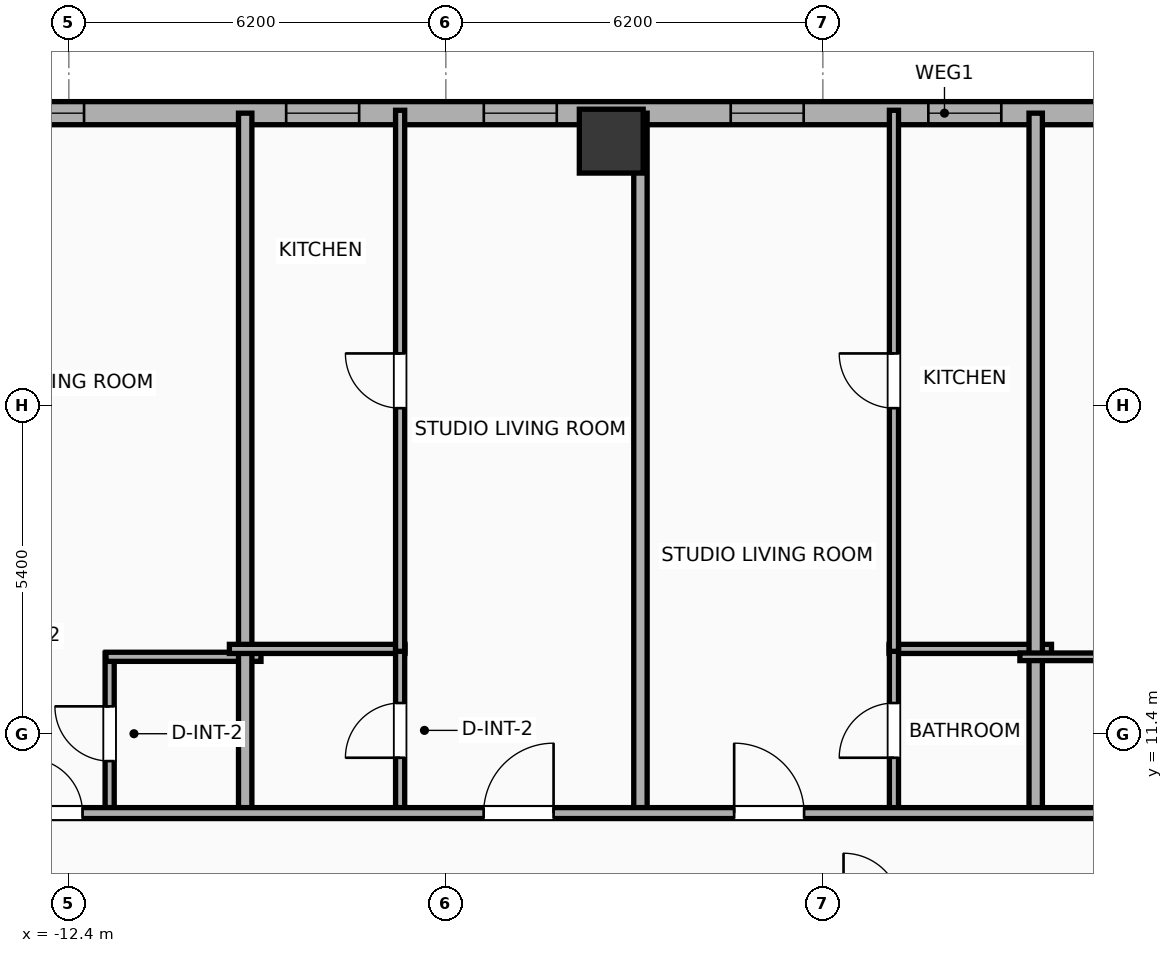
"""IFC4 building model, lengths in metres.
Left out: names, types, materials, properties, quantities, classifications, styles, units other than length and angle.
Written with IfcOpenShell. Run it as: python <this file> out.ifc"""

import sys

from ifc_helpers import new_model, si_unit, direction, frame, frame_2d, origin, origin_2d, place, context, subcontext, project, spatial, rectangle, hollow_rectangle, extrude, element, fill, save


model = new_model("IFC4")
c1 = context("Model", 3, precision=1e-05, world=origin(), true_north=direction((0.0, 1.0)))
c2 = subcontext(c1, "Body", "Model", "MODEL_VIEW")
j1 = project(units=[si_unit("LENGTHUNIT", "METRE"), si_unit("PLANEANGLEUNIT", "RADIAN")], contexts=[c1])
p1 = place(None, origin())
s1 = spatial("IfcSite", under=j1, at=p1, CompositionType="ELEMENT")
p2 = place(p1, origin())
s2 = spatial("IfcBuilding", under=s1, at=p2, CompositionType="ELEMENT")
p3 = place(p2, frame((0.0, 0.0, 128.7)))
s3 = spatial("IfcBuildingStorey", under=s2, at=p3, CompositionType="ELEMENT", Elevation=128.7)
p4 = place(p3, frame((-3.48, 21.15, 0.0), z_axis=(0.0, 0.0, 1.0), x_axis=(1.0, 0.0, 0.0)))
e1 = element("IfcColumn", 1, at=p4, inside=s3, PredefinedType="COLUMN", context=c2, shape_type="SweptSolid", body=[
    extrude(hollow_rectangle(XDim=1.05, YDim=1.05, WallThickness=0.036, at=origin_2d()), origin(), (0.0, 0.0, 1.0), 3.9),
])
p5 = place(p3, frame((-25.381, 21.61, 0.0), z_axis=(0.0, 0.0, 1.0), x_axis=(1.0, 0.0, 0.0)))
e2 = element("IfcWall", 2, at=p5, inside=s3, PredefinedType="ELEMENTEDWALL", context=c2, shape_type="SweptSolid", body=[
    extrude(rectangle(XDim=54.763, YDim=0.38, at=frame_2d((27.381, 0.0))), origin(), (0.0, 0.0, 1.0), 3.65),
])
p6 = place(p5, frame((5.645, 0.0, 0.75)))
e3 = element("IfcOpeningElement", 3, at=p6, cuts=e2, PredefinedType="OPENING", context=c2, shape_type="SweptSolid", body=[
    extrude(rectangle(XDim=2.4, YDim=2.1, at=frame_2d((1.2, 1.05))), frame((0.0, 0.2, 0.0), z_axis=(0.0, -1.0, 0.0), x_axis=(1.0, 0.0, 0.0)), (0.0, 0.0, 1.0), 0.4),
])
p7 = place(p5, frame((45.067, 0.0, 0.75)))
e4 = element("IfcOpeningElement", 4, at=p7, cuts=e2, PredefinedType="OPENING", context=c2, shape_type="SweptSolid", body=[
    extrude(rectangle(XDim=2.4, YDim=2.1, at=frame_2d((1.2, 1.05))), frame((0.0, 0.2, 0.0), z_axis=(0.0, -1.0, 0.0), x_axis=(1.0, 0.0, 0.0)), (0.0, 0.0, 1.0), 0.4),
])
p8 = place(p5, frame((1.286, 0.0, 0.75)))
e5 = element("IfcOpeningElement", 5, at=p8, cuts=e2, PredefinedType="OPENING", context=c2, shape_type="SweptSolid", body=[
    extrude(rectangle(XDim=1.2, YDim=2.05, at=frame_2d((0.6, 1.025))), frame((0.0, 0.2, 0.0), z_axis=(0.0, -1.0, 0.0), x_axis=(1.0, 0.0, 0.0)), (0.0, 0.0, 1.0), 0.4),
])
p9 = place(p5, frame((3.501, 0.0, 0.75)))
e6 = element("IfcOpeningElement", 6, at=p9, cuts=e2, PredefinedType="OPENING", context=c2, shape_type="SweptSolid", body=[
    extrude(rectangle(XDim=1.2, YDim=2.05, at=frame_2d((0.6, 1.025))), frame((0.0, 0.2, 0.0), z_axis=(0.0, -1.0, 0.0), x_axis=(1.0, 0.0, 0.0)), (0.0, 0.0, 1.0), 0.4),
])
p10 = place(p5, frame((12.031, 0.0, 0.75)))
e7 = element("IfcOpeningElement", 7, at=p10, cuts=e2, PredefinedType="OPENING", context=c2, shape_type="SweptSolid", body=[
    extrude(rectangle(XDim=1.2, YDim=2.05, at=frame_2d((0.6, 1.025))), frame((0.0, 0.2, 0.0), z_axis=(0.0, -1.0, 0.0), x_axis=(1.0, 0.0, 0.0)), (0.0, 0.0, 1.0), 0.4),
])
p11 = place(p5, frame((19.805, 0.0, 0.75)))
e8 = element("IfcOpeningElement", 8, at=p11, cuts=e2, PredefinedType="OPENING", context=c2, shape_type="SweptSolid", body=[
    extrude(rectangle(XDim=1.2, YDim=2.05, at=frame_2d((0.6, 1.025))), frame((0.0, 0.2, 0.0), z_axis=(0.0, -1.0, 0.0), x_axis=(1.0, 0.0, 0.0)), (0.0, 0.0, 1.0), 0.4),
])
p12 = place(p5, frame((16.555, 0.0, 0.75)))
e9 = element("IfcOpeningElement", 9, at=p12, cuts=e2, PredefinedType="OPENING", context=c2, shape_type="SweptSolid", body=[
    extrude(rectangle(XDim=1.2, YDim=2.05, at=frame_2d((0.6, 1.025))), frame((0.0, 0.2, 0.0), z_axis=(0.0, -1.0, 0.0), x_axis=(1.0, 0.0, 0.0)), (0.0, 0.0, 1.0), 0.4),
])
p13 = place(p5, frame((23.866, 0.0, 0.75)))
e10 = element("IfcOpeningElement", 10, at=p13, cuts=e2, PredefinedType="OPENING", context=c2, shape_type="SweptSolid", body=[
    extrude(rectangle(XDim=1.2, YDim=2.05, at=frame_2d((0.6, 1.025))), frame((0.0, 0.2, 0.0), z_axis=(0.0, -1.0, 0.0), x_axis=(1.0, 0.0, 0.0)), (0.0, 0.0, 1.0), 0.4),
])
p14 = place(p5, frame((27.116, 0.0, 0.75)))
e11 = element("IfcOpeningElement", 11, at=p14, cuts=e2, PredefinedType="OPENING", context=c2, shape_type="SweptSolid", body=[
    extrude(rectangle(XDim=1.2, YDim=2.05, at=frame_2d((0.6, 1.025))), frame((0.0, 0.2, 0.0), z_axis=(0.0, -1.0, 0.0), x_axis=(1.0, 0.0, 0.0)), (0.0, 0.0, 1.0), 0.4),
])
p15 = place(p5, frame((30.931, 0.0, 0.75)))
e12 = element("IfcOpeningElement", 12, at=p15, cuts=e2, PredefinedType="OPENING", context=c2, shape_type="SweptSolid", body=[
    extrude(rectangle(XDim=1.2, YDim=2.05, at=frame_2d((0.6, 1.025))), frame((0.0, 0.2, 0.0), z_axis=(0.0, -1.0, 0.0), x_axis=(1.0, 0.0, 0.0)), (0.0, 0.0, 1.0), 0.4),
])
p16 = place(p5, frame((36.811, 0.0, 0.75)))
e13 = element("IfcOpeningElement", 13, at=p16, cuts=e2, PredefinedType="OPENING", context=c2, shape_type="SweptSolid", body=[
    extrude(rectangle(XDim=1.2, YDim=2.05, at=frame_2d((0.6, 1.025))), frame((0.0, 0.2, 0.0), z_axis=(0.0, -1.0, 0.0), x_axis=(1.0, 0.0, 0.0)), (0.0, 0.0, 1.0), 0.4),
])
p17 = place(p5, frame((40.061, 0.0, 0.75)))
e14 = element("IfcOpeningElement", 14, at=p17, cuts=e2, PredefinedType="OPENING", context=c2, shape_type="SweptSolid", body=[
    extrude(rectangle(XDim=1.2, YDim=2.05, at=frame_2d((0.6, 1.025))), frame((0.0, 0.2, 0.0), z_axis=(0.0, -1.0, 0.0), x_axis=(1.0, 0.0, 0.0)), (0.0, 0.0, 1.0), 0.4),
])
p18 = place(p5, frame((50.527, 0.0, 0.75)))
e15 = element("IfcOpeningElement", 15, at=p18, cuts=e2, PredefinedType="OPENING", context=c2, shape_type="SweptSolid", body=[
    extrude(rectangle(XDim=1.2, YDim=2.05, at=frame_2d((0.6, 1.025))), frame((0.0, 0.2, 0.0), z_axis=(0.0, -1.0, 0.0), x_axis=(1.0, 0.0, 0.0)), (0.0, 0.0, 1.0), 0.4),
])
p19 = place(p3, frame((-11.729, 10.08, 0.0), z_axis=(0.0, 0.0, 1.0), x_axis=(0.0, 1.0, 0.0)))
e16 = element("IfcWall", 16, at=p19, inside=s3, PredefinedType="PLUMBINGWALL", context=c2, shape_type="SweptSolid", body=[
    extrude(rectangle(XDim=2.65, YDim=0.15, at=frame_2d((1.325, 0.0))), origin(), (0.0, 0.0, 1.0), 3.65),
])
p20 = place(p19, frame((0.875, 0.0, 0.0)))
e17 = element("IfcOpeningElement", 17, at=p20, cuts=e16, PredefinedType="OPENING", context=c2, shape_type="SweptSolid", body=[
    extrude(rectangle(XDim=0.9, YDim=2.05, at=frame_2d((0.45, 1.025))), frame((0.0, 0.085, 0.0), z_axis=(0.0, -1.0, 0.0), x_axis=(1.0, 0.0, 0.0)), (0.0, 0.0, 1.0), 0.17),
])
p21 = place(p3, frame((-11.789, 12.67, 0.0), z_axis=(0.0, 0.0, 1.0), x_axis=(1.0, 0.0, 0.0)))
e18 = element("IfcWall", 18, at=p21, inside=s3, PredefinedType="PLUMBINGWALL", context=c2, shape_type="SweptSolid", body=[
    extrude(rectangle(XDim=2.549, YDim=0.15, at=frame_2d((1.274, 0.0))), origin(), (0.0, 0.0, 1.0), 3.65),
])
p22 = place(p3, frame((-9.5, 10.02, 0.0), z_axis=(0.0, 0.0, 1.0), x_axis=(0.0, 1.0, 0.0)))
e19 = element("IfcWall", 19, at=p22, inside=s3, PredefinedType="PARTITIONING", context=c2, shape_type="SweptSolid", body=[
    extrude(rectangle(XDim=11.59, YDim=0.22, at=frame_2d((5.795, 0.0))), origin(), (0.0, 0.0, 1.0), 3.65),
])
p23 = place(p3, frame((-9.76, 12.8, 0.0), z_axis=(0.0, 0.0, 1.0), x_axis=(1.0, 0.0, 0.0)))
e20 = element("IfcWall", 20, at=p23, inside=s3, PredefinedType="PLUMBINGWALL", context=c2, shape_type="SweptSolid", body=[
    extrude(rectangle(XDim=2.888, YDim=0.15, at=frame_2d((1.444, 0.0))), origin(), (0.0, 0.0, 1.0), 3.65),
])
p24 = place(p3, frame((-6.952, 10.08, 0.0), z_axis=(0.0, 0.0, 1.0), x_axis=(0.0, 1.0, 0.0)))
e21 = element("IfcWall", 21, at=p24, inside=s3, PredefinedType="PLUMBINGWALL", context=c2, shape_type="SweptSolid", body=[
    extrude(rectangle(XDim=2.76, YDim=0.15, at=frame_2d((1.38, 0.0))), origin(), (0.0, 0.0, 1.0), 3.65),
])
p25 = place(p24, frame((0.93, 0.0, 0.0)))
e22 = element("IfcOpeningElement", 22, at=p25, cuts=e21, PredefinedType="OPENING", context=c2, shape_type="SweptSolid", body=[
    extrude(rectangle(XDim=0.9, YDim=2.05, at=frame_2d((0.45, 1.025))), frame((0.0, 0.085, 0.0), z_axis=(0.0, -1.0, 0.0), x_axis=(1.0, 0.0, 0.0)), (0.0, 0.0, 1.0), 0.17),
])
p26 = place(p3, frame((-6.952, 12.76, 0.0), z_axis=(0.0, 0.0, 1.0), x_axis=(0.0, 1.0, 0.0)))
e23 = element("IfcWall", 23, at=p26, inside=s3, PredefinedType="PLUMBINGWALL", context=c2, shape_type="SweptSolid", body=[
    extrude(rectangle(XDim=8.898, YDim=0.15, at=frame_2d((4.449, 0.0))), origin(), (0.0, 0.0, 1.0), 3.65),
])
p27 = place(p26, frame((3.999, 0.0, 0.0)))
e24 = element("IfcOpeningElement", 24, at=p27, cuts=e23, PredefinedType="OPENING", context=c2, shape_type="SweptSolid", body=[
    extrude(rectangle(XDim=0.9, YDim=2.05, at=frame_2d((0.45, 1.025))), frame((0.0, 0.085, 0.0), z_axis=(0.0, -1.0, 0.0), x_axis=(1.0, 0.0, 0.0)), (0.0, 0.0, 1.0), 0.17),
])
p28 = place(p3, frame((-3.0, 10.02, 0.0), z_axis=(0.0, 0.0, 1.0), x_axis=(0.0, 1.0, 0.0)))
e25 = element("IfcWall", 25, at=p28, inside=s3, PredefinedType="PARTITIONING", context=c2, shape_type="SweptSolid", body=[
    extrude(rectangle(XDim=11.59, YDim=0.22, at=frame_2d((5.795, 0.0))), origin(), (0.0, 0.0, 1.0), 3.65),
])
p29 = place(p3, frame((1.089, 12.8, 0.0), z_axis=(0.0, 0.0, 1.0), x_axis=(1.0, 0.0, 0.0)))
e26 = element("IfcWall", 26, at=p29, inside=s3, PredefinedType="PLUMBINGWALL", context=c2, shape_type="SweptSolid", body=[
    extrude(rectangle(XDim=2.671, YDim=0.15, at=frame_2d((1.335, 0.0))), origin(), (0.0, 0.0, 1.0), 3.65),
])
p30 = place(p3, frame((1.169, 10.08, 0.0), z_axis=(0.0, 0.0, 1.0), x_axis=(0.0, 1.0, 0.0)))
e27 = element("IfcWall", 27, at=p30, inside=s3, PredefinedType="PLUMBINGWALL", context=c2, shape_type="SweptSolid", body=[
    extrude(rectangle(XDim=2.76, YDim=0.15, at=frame_2d((1.38, 0.0))), origin(), (0.0, 0.0, 1.0), 3.65),
])
p31 = place(p30, frame((0.93, 0.0, 0.0)))
e28 = element("IfcOpeningElement", 28, at=p31, cuts=e27, PredefinedType="OPENING", context=c2, shape_type="SweptSolid", body=[
    extrude(rectangle(XDim=0.9, YDim=2.05, at=frame_2d((0.45, 1.025))), frame((0.0, 0.085, 0.0), z_axis=(0.0, -1.0, 0.0), x_axis=(1.0, 0.0, 0.0)), (0.0, 0.0, 1.0), 0.17),
])
p32 = place(p3, frame((1.169, 12.76, 0.0), z_axis=(0.0, 0.0, 1.0), x_axis=(0.0, 1.0, 0.0)))
e29 = element("IfcWall", 29, at=p32, inside=s3, PredefinedType="PLUMBINGWALL", context=c2, shape_type="SweptSolid", body=[
    extrude(rectangle(XDim=8.898, YDim=0.15, at=frame_2d((4.449, 0.0))), origin(), (0.0, 0.0, 1.0), 3.65),
])
p33 = place(p32, frame((3.999, 0.0, 0.0)))
e30 = element("IfcOpeningElement", 30, at=p33, cuts=e29, PredefinedType="OPENING", context=c2, shape_type="SweptSolid", body=[
    extrude(rectangle(XDim=0.9, YDim=2.05, at=frame_2d((0.45, 1.025))), frame((0.0, 0.085, 0.0), z_axis=(0.0, -1.0, 0.0), x_axis=(1.0, 0.0, 0.0)), (0.0, 0.0, 1.0), 0.17),
])
p34 = place(p3, frame((3.5, 10.02, 0.0), z_axis=(0.0, 0.0, 1.0), x_axis=(0.0, 1.0, 0.0)))
e31 = element("IfcWall", 31, at=p34, inside=s3, PredefinedType="PARTITIONING", context=c2, shape_type="SweptSolid", body=[
    extrude(rectangle(XDim=11.59, YDim=0.22, at=frame_2d((5.795, 0.0))), origin(), (0.0, 0.0, 1.0), 3.65),
])
p35 = place(p3, frame((3.24, 12.67, 0.0), z_axis=(0.0, 0.0, 1.0), x_axis=(1.0, 0.0, 0.0)))
e32 = element("IfcWall", 32, at=p35, inside=s3, PredefinedType="PARTITIONING", context=c2, shape_type="SweptSolid", body=[
    extrude(rectangle(XDim=2.804, YDim=0.125, at=frame_2d((1.402, 0.0))), origin(), (0.0, 0.0, 1.0), 3.65),
])
p36 = place(p3, frame((-29.21, 10.1, 0.0), z_axis=(0.0, 0.0, 1.0), x_axis=(1.0, 0.0, 0.0)))
e33 = element("IfcWall", 33, at=p36, inside=s3, PredefinedType="PARTITIONING", context=c2, shape_type="SweptSolid", body=[
    extrude(rectangle(XDim=62.42, YDim=0.18, at=frame_2d((31.21, 0.0))), origin(), (0.0, 0.0, 1.0), 3.65),
])
p37 = place(p36, frame((3.033, 0.0, 0.0)))
e34 = element("IfcOpeningElement", 34, at=p37, cuts=e33, PredefinedType="OPENING", context=c2, shape_type="SweptSolid", body=[
    extrude(rectangle(XDim=0.9, YDim=2.05, at=frame_2d((0.45, 1.025))), frame((0.0, 0.1, 0.0), z_axis=(0.0, -1.0, 0.0), x_axis=(1.0, 0.0, 0.0)), (0.0, 0.0, 1.0), 0.2),
])
p38 = place(p36, frame((10.573, 0.0, 0.0)))
e35 = element("IfcOpeningElement", 35, at=p38, cuts=e33, PredefinedType="OPENING", context=c2, shape_type="SweptSolid", body=[
    extrude(rectangle(XDim=1.15, YDim=2.05, at=frame_2d((0.575, 1.025))), frame((0.0, 0.1, 0.0), z_axis=(0.0, -1.0, 0.0), x_axis=(1.0, 0.0, 0.0)), (0.0, 0.0, 1.0), 0.2),
])
p39 = place(p36, frame((16.135, 0.0, 0.0)))
e36 = element("IfcOpeningElement", 36, at=p39, cuts=e33, PredefinedType="OPENING", context=c2, shape_type="SweptSolid", body=[
    extrude(rectangle(XDim=0.9, YDim=2.05, at=frame_2d((0.45, 1.025))), frame((0.0, 0.1, 0.0), z_axis=(0.0, -1.0, 0.0), x_axis=(1.0, 0.0, 0.0)), (0.0, 0.0, 1.0), 0.2),
])
p40 = place(p36, frame((23.632, 0.0, 0.0)))
e37 = element("IfcOpeningElement", 37, at=p40, cuts=e33, PredefinedType="OPENING", context=c2, shape_type="SweptSolid", body=[
    extrude(rectangle(XDim=1.15, YDim=2.05, at=frame_2d((0.575, 1.025))), frame((0.0, 0.1, 0.0), z_axis=(0.0, -1.0, 0.0), x_axis=(1.0, 0.0, 0.0)), (0.0, 0.0, 1.0), 0.2),
])
p41 = place(p36, frame((27.751, 0.0, 0.0)))
e38 = element("IfcOpeningElement", 38, at=p41, cuts=e33, PredefinedType="OPENING", context=c2, shape_type="SweptSolid", body=[
    extrude(rectangle(XDim=1.15, YDim=2.05, at=frame_2d((0.575, 1.025))), frame((0.0, 0.1, 0.0), z_axis=(0.0, -1.0, 0.0), x_axis=(1.0, 0.0, 0.0)), (0.0, 0.0, 1.0), 0.2),
])
p42 = place(p36, frame((35.635, 0.0, 0.0)))
e39 = element("IfcOpeningElement", 39, at=p42, cuts=e33, PredefinedType="OPENING", context=c2, shape_type="SweptSolid", body=[
    extrude(rectangle(XDim=0.9, YDim=2.05, at=frame_2d((0.45, 1.025))), frame((0.0, 0.1, 0.0), z_axis=(0.0, -1.0, 0.0), x_axis=(1.0, 0.0, 0.0)), (0.0, 0.0, 1.0), 0.2),
])
p43 = place(p36, frame((40.697, 0.0, 0.0)))
e40 = element("IfcOpeningElement", 40, at=p43, cuts=e33, PredefinedType="OPENING", context=c2, shape_type="SweptSolid", body=[
    extrude(rectangle(XDim=1.15, YDim=2.05, at=frame_2d((0.575, 1.025))), frame((0.0, 0.1, 0.0), z_axis=(0.0, -1.0, 0.0), x_axis=(1.0, 0.0, 0.0)), (0.0, 0.0, 1.0), 0.2),
])
p44 = place(p36, frame((48.637, 0.0, 0.0)))
e41 = element("IfcOpeningElement", 41, at=p44, cuts=e33, PredefinedType="OPENING", context=c2, shape_type="SweptSolid", body=[
    extrude(rectangle(XDim=0.9, YDim=2.05, at=frame_2d((0.45, 1.025))), frame((0.0, 0.1, 0.0), z_axis=(0.0, -1.0, 0.0), x_axis=(1.0, 0.0, 0.0)), (0.0, 0.0, 1.0), 0.2),
])
p45 = place(p36, frame((57.213, 0.0, 0.0)))
e42 = element("IfcOpeningElement", 42, at=p45, cuts=e33, PredefinedType="OPENING", context=c2, shape_type="SweptSolid", body=[
    extrude(rectangle(XDim=1.15, YDim=2.05, at=frame_2d((0.575, 1.025))), frame((0.0, 0.1, 0.0), z_axis=(0.0, -1.0, 0.0), x_axis=(1.0, 0.0, 0.0)), (0.0, 0.0, 1.0), 0.2),
])
p46 = place(p10, origin())
e43 = element("IfcWindow", 43, at=p46, inside=s3, PartitioningType="SINGLE_PANEL", PredefinedType="WINDOW", context=c2, shape_type="SweptSolid", body=[
    extrude(rectangle(XDim=1.2, YDim=2.05, at=frame_2d((0.6, 1.025))), frame((0.0, 0.03, 0.0), z_axis=(0.0, -1.0, 0.0), x_axis=(1.0, 0.0, 0.0)), (0.0, 0.0, 1.0), 0.06),
])
fill(e7, e43)
p47 = place(p11, origin())
e44 = element("IfcWindow", 44, at=p47, inside=s3, PartitioningType="SINGLE_PANEL", PredefinedType="WINDOW", context=c2, shape_type="SweptSolid", body=[
    extrude(rectangle(XDim=1.2, YDim=2.05, at=frame_2d((0.6, 1.025))), frame((0.0, 0.03, 0.0), z_axis=(0.0, -1.0, 0.0), x_axis=(1.0, 0.0, 0.0)), (0.0, 0.0, 1.0), 0.06),
])
fill(e8, e44)
p48 = place(p12, origin())
e45 = element("IfcWindow", 45, at=p48, inside=s3, PartitioningType="SINGLE_PANEL", PredefinedType="WINDOW", context=c2, shape_type="SweptSolid", body=[
    extrude(rectangle(XDim=1.2, YDim=2.05, at=frame_2d((0.6, 1.025))), frame((0.0, 0.03, 0.0), z_axis=(0.0, -1.0, 0.0), x_axis=(1.0, 0.0, 0.0)), (0.0, 0.0, 1.0), 0.06),
])
fill(e9, e45)
p49 = place(p13, origin())
e46 = element("IfcWindow", 46, at=p49, inside=s3, PartitioningType="SINGLE_PANEL", PredefinedType="WINDOW", context=c2, shape_type="SweptSolid", body=[
    extrude(rectangle(XDim=1.2, YDim=2.05, at=frame_2d((0.6, 1.025))), frame((0.0, 0.03, 0.0), z_axis=(0.0, -1.0, 0.0), x_axis=(1.0, 0.0, 0.0)), (0.0, 0.0, 1.0), 0.06),
])
fill(e10, e46)
p50 = place(p14, origin())
e47 = element("IfcWindow", 47, at=p50, inside=s3, PartitioningType="SINGLE_PANEL", PredefinedType="WINDOW", context=c2, shape_type="SweptSolid", body=[
    extrude(rectangle(XDim=1.2, YDim=2.05, at=frame_2d((0.6, 1.025))), frame((0.0, 0.03, 0.0), z_axis=(0.0, -1.0, 0.0), x_axis=(1.0, 0.0, 0.0)), (0.0, 0.0, 1.0), 0.06),
])
fill(e11, e47)
p51 = place(p20, origin())
e48 = element("IfcDoor", 48, at=p51, inside=s3, OperationType="SINGLE_SWING_RIGHT", PredefinedType="DOOR", context=c2, shape_type="SweptSolid", body=[
    extrude(rectangle(XDim=0.9, YDim=2.05, at=frame_2d((0.45, 1.025))), frame((0.0, 0.025, 0.0), z_axis=(0.0, -1.0, 0.0), x_axis=(1.0, 0.0, 0.0)), (0.0, 0.0, 1.0), 0.05),
])
fill(e17, e48)
p52 = place(p25, origin())
e49 = element("IfcDoor", 49, at=p52, inside=s3, OperationType="SINGLE_SWING_LEFT", PredefinedType="DOOR", context=c2, shape_type="SweptSolid", body=[
    extrude(rectangle(XDim=0.9, YDim=2.05, at=frame_2d((0.45, 1.025))), frame((0.0, 0.025, 0.0), z_axis=(0.0, -1.0, 0.0), x_axis=(1.0, 0.0, 0.0)), (0.0, 0.0, 1.0), 0.05),
])
fill(e22, e49)
p53 = place(p27, origin())
e50 = element("IfcDoor", 50, at=p53, inside=s3, OperationType="SINGLE_SWING_RIGHT", PredefinedType="DOOR", context=c2, shape_type="SweptSolid", body=[
    extrude(rectangle(XDim=0.9, YDim=2.05, at=frame_2d((0.45, 1.025))), frame((0.0, 0.025, 0.0), z_axis=(0.0, -1.0, 0.0), x_axis=(1.0, 0.0, 0.0)), (0.0, 0.0, 1.0), 0.05),
])
fill(e24, e50)
p54 = place(p31, origin())
e51 = element("IfcDoor", 51, at=p54, inside=s3, OperationType="SINGLE_SWING_LEFT", PredefinedType="DOOR", context=c2, shape_type="SweptSolid", body=[
    extrude(rectangle(XDim=0.9, YDim=2.05, at=frame_2d((0.45, 1.025))), frame((0.0, 0.025, 0.0), z_axis=(0.0, -1.0, 0.0), x_axis=(1.0, 0.0, 0.0)), (0.0, 0.0, 1.0), 0.05),
])
fill(e28, e51)
p55 = place(p33, origin())
e52 = element("IfcDoor", 52, at=p55, inside=s3, OperationType="SINGLE_SWING_RIGHT", PredefinedType="DOOR", context=c2, shape_type="SweptSolid", body=[
    extrude(rectangle(XDim=0.9, YDim=2.05, at=frame_2d((0.45, 1.025))), frame((0.0, 0.025, 0.0), z_axis=(0.0, -1.0, 0.0), x_axis=(1.0, 0.0, 0.0)), (0.0, 0.0, 1.0), 0.05),
])
fill(e30, e52)
p56 = place(p39, origin())
e53 = element("IfcDoor", 53, at=p56, inside=s3, OperationType="SINGLE_SWING_LEFT", PredefinedType="DOOR", context=c2, shape_type="SweptSolid", body=[
    extrude(rectangle(XDim=0.9, YDim=2.05, at=frame_2d((0.45, 1.025))), frame((0.0, 0.025, 0.0), z_axis=(0.0, -1.0, 0.0), x_axis=(1.0, 0.0, 0.0)), (0.0, 0.0, 1.0), 0.05),
])
fill(e36, e53)
p57 = place(p40, origin())
e54 = element("IfcDoor", 54, at=p57, inside=s3, OperationType="SINGLE_SWING_RIGHT", PredefinedType="DOOR", context=c2, shape_type="SweptSolid", body=[
    extrude(rectangle(XDim=1.15, YDim=2.05, at=frame_2d((0.575, 1.025))), frame((0.0, 0.025, 0.0), z_axis=(0.0, -1.0, 0.0), x_axis=(1.0, 0.0, 0.0)), (0.0, 0.0, 1.0), 0.05),
])
fill(e37, e54)
p58 = place(p41, origin())
e55 = element("IfcDoor", 55, at=p58, inside=s3, OperationType="SINGLE_SWING_LEFT", PredefinedType="DOOR", context=c2, shape_type="SweptSolid", body=[
    extrude(rectangle(XDim=1.15, YDim=2.05, at=frame_2d((0.575, 1.025))), frame((0.0, 0.025, 0.0), z_axis=(0.0, -1.0, 0.0), x_axis=(1.0, 0.0, 0.0)), (0.0, 0.0, 1.0), 0.05),
])
fill(e38, e55)
save(model, sys.argv[1])
